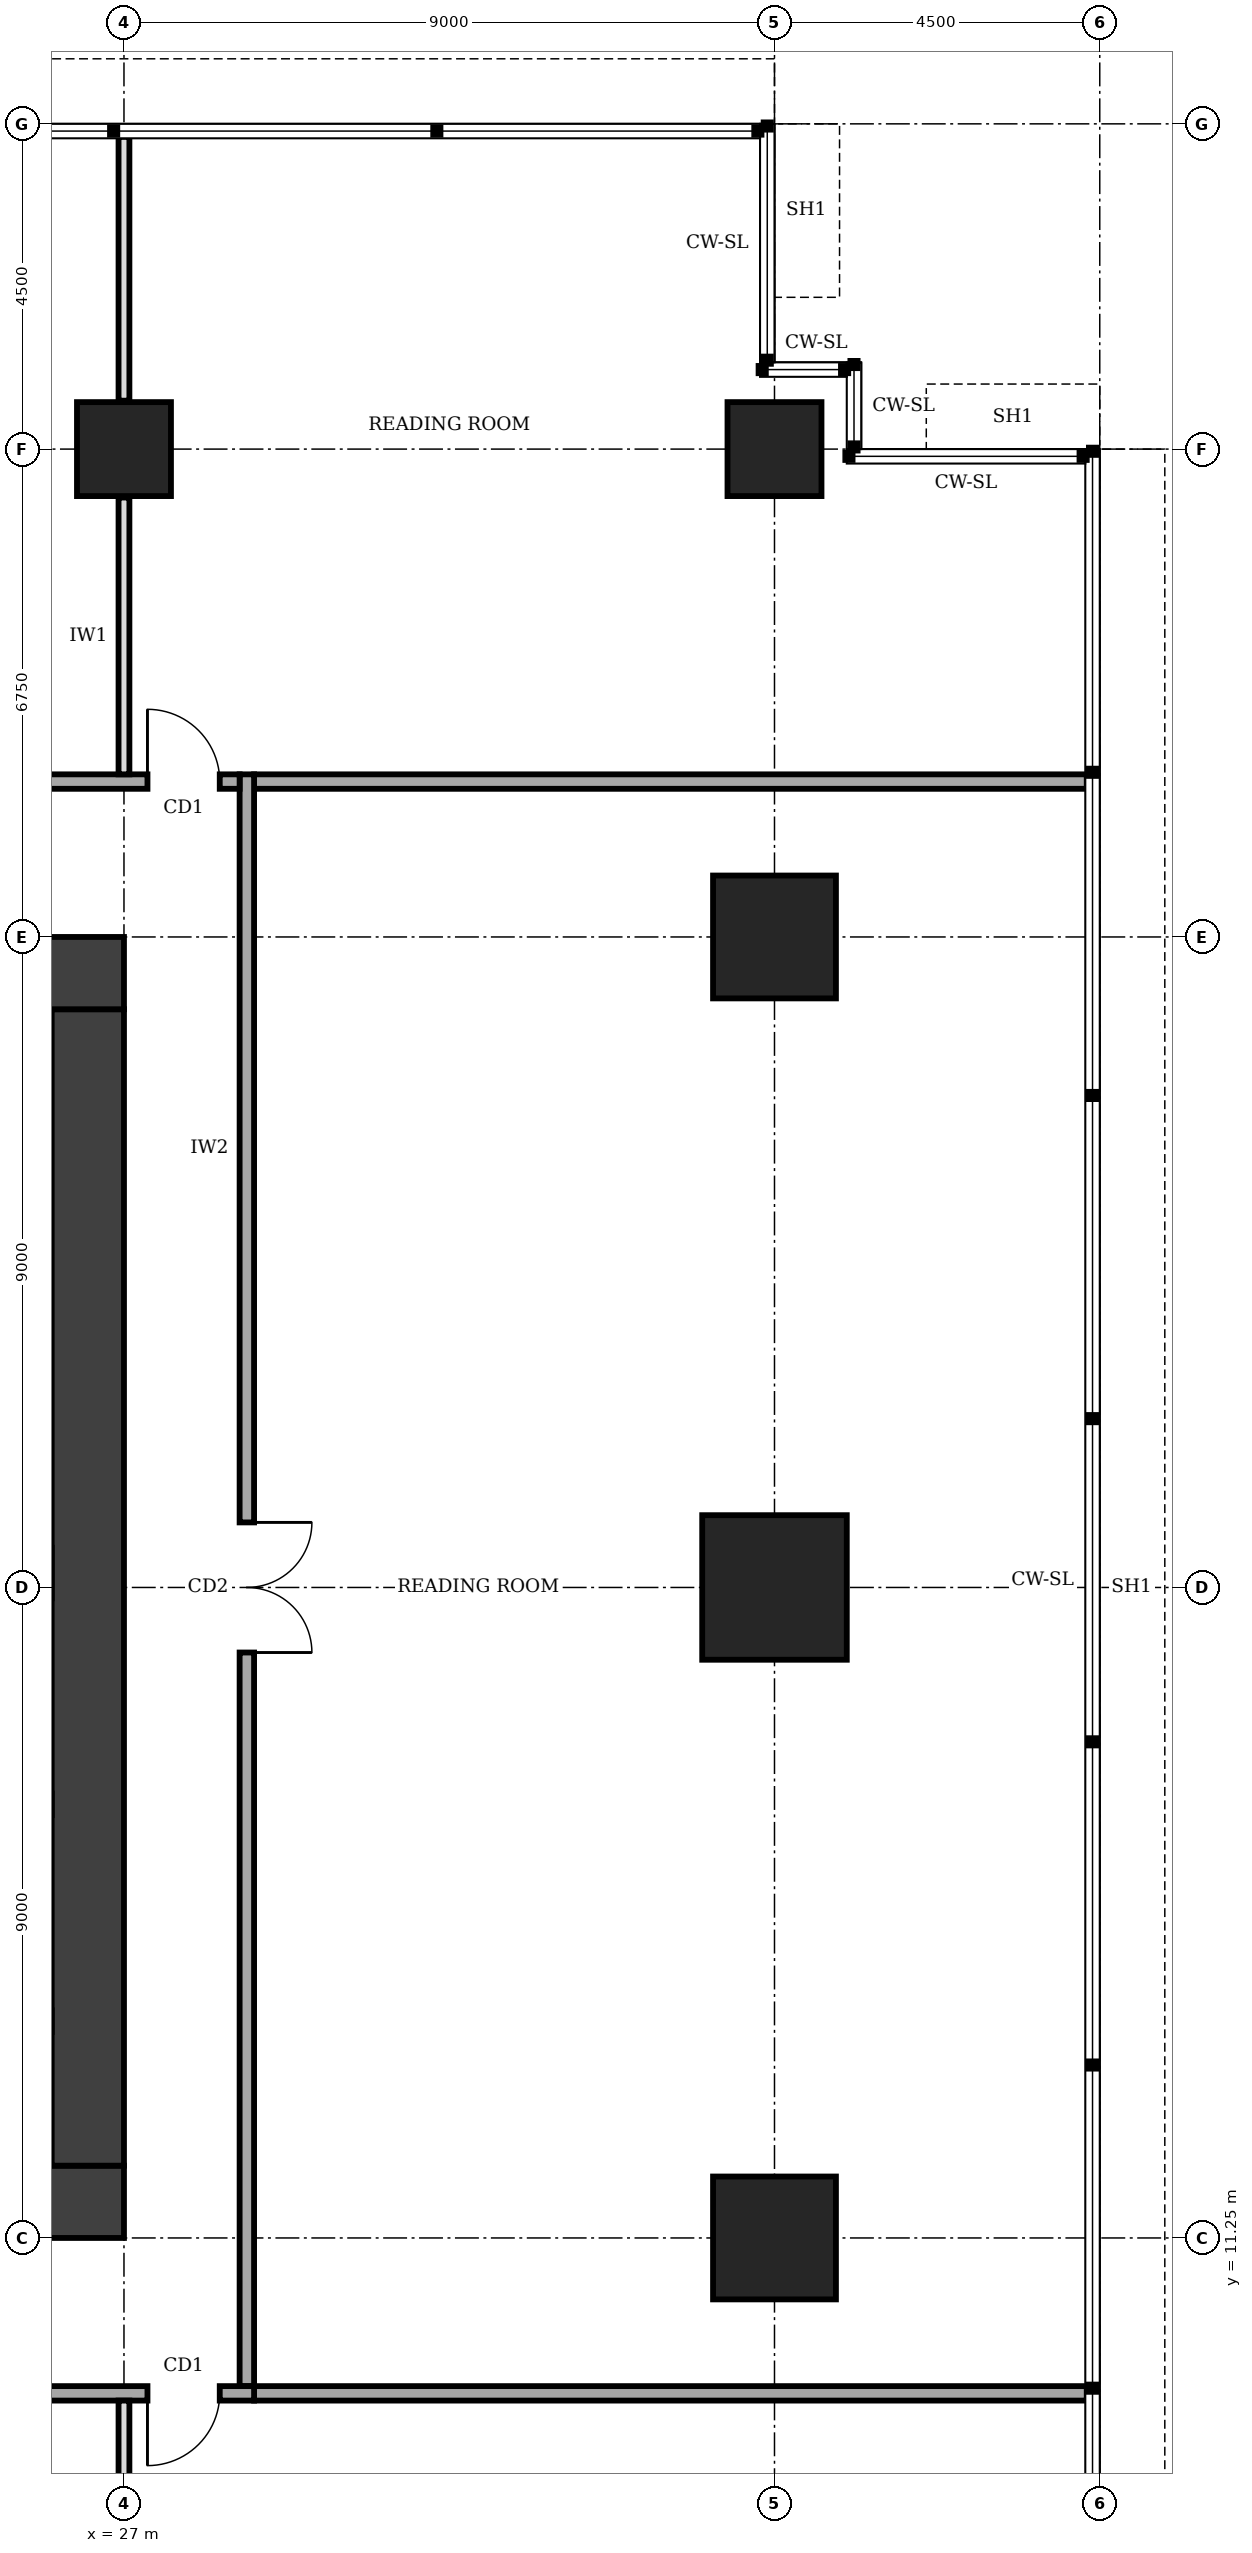
"""IFC4 building model, lengths in metres.
Left out: names, types, materials, properties, quantities, classifications, styles, units other than length and angle.
Written with IfcOpenShell. Run it as: python <this file> out.ifc"""

import sys

from ifc_helpers import new_model, si_unit, direction, frame, frame_2d, origin, origin_2d, place, context, subcontext, project, spatial, rectangle, extrude, element, fill, save


model = new_model("IFC4")
c1 = context("Model", 3, precision=1e-05, world=origin(), true_north=direction((0.0, 1.0)))
c2 = subcontext(c1, "Body", "Model", "MODEL_VIEW")
j1 = project(units=[si_unit("LENGTHUNIT", "METRE"), si_unit("PLANEANGLEUNIT", "RADIAN")], contexts=[c1])
p1 = place(None, origin())
s1 = spatial("IfcSite", under=j1, at=p1, CompositionType="ELEMENT")
p2 = place(p1, origin())
s2 = spatial("IfcBuilding", under=s1, at=p2, CompositionType="ELEMENT")
p3 = place(p2, frame((0.0, 0.0, 293.0)))
s3 = spatial("IfcBuildingStorey", under=s2, at=p3, CompositionType="ELEMENT", Elevation=293.0)
p4 = place(p3, frame((13.5, 11.75, 0.0), z_axis=(0.0, 0.0, 1.0), x_axis=(1.0, 0.0, 0.0)))
e1 = element("IfcWall", 1, at=p4, inside=s3, PredefinedType="SHEAR", context=c2, shape_type="SweptSolid", body=[
    extrude(rectangle(XDim=13.5, YDim=1.0, at=frame_2d((6.75, 0.0))), origin(), (0.0, 0.0, 1.0), 4.0),
])
p5 = place(p4, frame((4.75, 0.0, 0.0)))
e2 = element("IfcOpeningElement", 2, at=p5, cuts=e1, PredefinedType="OPENING", context=c2, shape_type="SweptSolid", body=[
    extrude(rectangle(XDim=1.0, YDim=2.1, at=frame_2d((0.5, 1.05))), frame((0.0, 0.51, 0.0), z_axis=(0.0, -1.0, 0.0), x_axis=(1.0, 0.0, 0.0)), (0.0, 0.0, 1.0), 1.02),
])
p6 = place(p3, frame((26.5, 12.25, 0.0), z_axis=(0.0, 0.0, 1.0), x_axis=(0.0, 1.0, 0.0)))
e3 = element("IfcWall", 3, at=p6, inside=s3, PredefinedType="SHEAR", context=c2, shape_type="SweptSolid", body=[
    extrude(rectangle(XDim=16.0, YDim=1.0, at=frame_2d((8.0, 0.0))), origin(), (0.0, 0.0, 1.0), 4.0),
])
p7 = place(p3, frame((27.0, 28.75, 0.0), z_axis=(0.0, 0.0, 1.0), x_axis=(-1.0, 0.0, 0.0)))
e4 = element("IfcWall", 4, at=p7, inside=s3, PredefinedType="SHEAR", context=c2, shape_type="SweptSolid", body=[
    extrude(rectangle(XDim=13.5, YDim=1.0, at=frame_2d((6.75, 0.0))), origin(), (0.0, 0.0, 1.0), 4.0),
])
p8 = place(p7, frame((4.75, 0.0, 0.0)))
e5 = element("IfcOpeningElement", 5, at=p8, cuts=e4, PredefinedType="OPENING", context=c2, shape_type="SweptSolid", body=[
    extrude(rectangle(XDim=1.8, YDim=2.1, at=frame_2d((0.9, 1.05))), frame((0.0, 0.51, 0.0), z_axis=(0.0, -1.0, 0.0), x_axis=(1.0, 0.0, 0.0)), (0.0, 0.0, 1.0), 1.02),
])
p9 = place(p3, frame((36.0, 11.25, 0.0), z_axis=(0.0, 0.0, 1.0), x_axis=(1.0, 0.0, 0.0)))
e6 = element("IfcColumn", 6, at=p9, inside=s3, PredefinedType="COLUMN", context=c2, shape_type="SweptSolid", body=[
    extrude(rectangle(XDim=1.7, YDim=1.7, at=origin_2d()), origin(), (0.0, 0.0, 1.0), 4.0),
])
p10 = place(p3, frame((36.0, 20.25, 0.0), z_axis=(0.0, 0.0, 1.0), x_axis=(1.0, 0.0, 0.0)))
e7 = element("IfcColumn", 7, at=p10, inside=s3, PredefinedType="COLUMN", context=c2, shape_type="SweptSolid", body=[
    extrude(rectangle(XDim=2.0, YDim=2.0, at=origin_2d()), origin(), (0.0, 0.0, 1.0), 4.0),
])
p11 = place(p3, frame((36.0, 29.25, 0.0), z_axis=(0.0, 0.0, 1.0), x_axis=(1.0, 0.0, 0.0)))
e8 = element("IfcColumn", 8, at=p11, inside=s3, PredefinedType="COLUMN", context=c2, shape_type="SweptSolid", body=[
    extrude(rectangle(XDim=1.7, YDim=1.7, at=origin_2d()), origin(), (0.0, 0.0, 1.0), 4.0),
])
for number, where, z_axis, x_axis in (
    (9, (27.0, 36.0, 0.0), (0.0, 0.0, 1.0), (1.0, 0.0, 0.0)),
    (10, (36.0, 36.0, 0.0), (0.0, 0.0, 1.0), (1.0, 0.0, 0.0)),
):
    element("IfcColumn", number, at=place(p3, frame(where, z_axis=z_axis, x_axis=x_axis)), inside=s3, PredefinedType="COLUMN", context=c2, shape_type="SweptSolid", body=[
        extrude(rectangle(XDim=1.3, YDim=1.3, at=origin_2d()), origin(), (0.0, 0.0, 1.0), 4.0),
    ])
p12 = place(p3, frame((11.9, 9.1, 0.0), z_axis=(0.0, 0.0, 1.0), x_axis=(1.0, 0.0, 0.0)))
e11 = element("IfcWall", 11, at=p12, inside=s3, PredefinedType="SOLIDWALL", context=c2, shape_type="SweptSolid", body=[
    extrude(rectangle(XDim=16.9, YDim=0.2, at=frame_2d((8.45, 0.0))), origin(), (0.0, 0.0, 1.0), 3.75),
])
p13 = place(p12, frame((0.275, 0.0, 0.0)))
e12 = element("IfcOpeningElement", 12, at=p13, cuts=e11, PredefinedType="OPENING", context=c2, shape_type="SweptSolid", body=[
    extrude(rectangle(XDim=1.0, YDim=2.1, at=frame_2d((0.5, 1.05))), frame((0.0, 0.11, 0.0), z_axis=(0.0, -1.0, 0.0), x_axis=(1.0, 0.0, 0.0)), (0.0, 0.0, 1.0), 0.22),
])
p14 = place(p12, frame((7.45, 0.0, 0.0)))
e13 = element("IfcOpeningElement", 13, at=p14, cuts=e11, PredefinedType="OPENING", context=c2, shape_type="SweptSolid", body=[
    extrude(rectangle(XDim=1.8, YDim=2.1, at=frame_2d((0.9, 1.05))), frame((0.0, 0.11, 0.0), z_axis=(0.0, -1.0, 0.0), x_axis=(1.0, 0.0, 0.0)), (0.0, 0.0, 1.0), 0.22),
])
p15 = place(p12, frame((15.425, 0.0, 0.0)))
e14 = element("IfcOpeningElement", 14, at=p15, cuts=e11, PredefinedType="OPENING", context=c2, shape_type="SweptSolid", body=[
    extrude(rectangle(XDim=1.0, YDim=2.1, at=frame_2d((0.5, 1.05))), frame((0.0, 0.11, 0.0), z_axis=(0.0, -1.0, 0.0), x_axis=(1.0, 0.0, 0.0)), (0.0, 0.0, 1.0), 0.22),
])
p16 = place(p3, frame((28.7, 9.2, 0.0), z_axis=(0.0, 0.0, 1.0), x_axis=(0.0, 1.0, 0.0)))
e15 = element("IfcWall", 15, at=p16, inside=s3, PredefinedType="SOLIDWALL", context=c2, shape_type="SweptSolid", body=[
    extrude(rectangle(XDim=22.3, YDim=0.2, at=frame_2d((11.15, 0.0))), origin(), (0.0, 0.0, 1.0), 3.75),
])
p17 = place(p16, frame((10.15, 0.0, 0.0)))
e16 = element("IfcOpeningElement", 16, at=p17, cuts=e15, PredefinedType="OPENING", context=c2, shape_type="SweptSolid", body=[
    extrude(rectangle(XDim=1.8, YDim=2.1, at=frame_2d((0.9, 1.05))), frame((0.0, 0.11, 0.0), z_axis=(0.0, -1.0, 0.0), x_axis=(1.0, 0.0, 0.0)), (0.0, 0.0, 1.0), 0.22),
])
p18 = place(p3, frame((28.6, 31.4, 0.0), z_axis=(0.0, 0.0, 1.0), x_axis=(-1.0, 0.0, 0.0)))
e17 = element("IfcWall", 17, at=p18, inside=s3, PredefinedType="SOLIDWALL", context=c2, shape_type="SweptSolid", body=[
    extrude(rectangle(XDim=16.9, YDim=0.2, at=frame_2d((8.45, 0.0))), origin(), (0.0, 0.0, 1.0), 3.75),
])
p19 = place(p18, frame((15.425, 0.0, 0.0)))
e18 = element("IfcOpeningElement", 18, at=p19, cuts=e17, PredefinedType="OPENING", context=c2, shape_type="SweptSolid", body=[
    extrude(rectangle(XDim=1.0, YDim=2.1, at=frame_2d((0.5, 1.05))), frame((0.0, 0.11, 0.0), z_axis=(0.0, -1.0, 0.0), x_axis=(1.0, 0.0, 0.0)), (0.0, 0.0, 1.0), 0.22),
])
p20 = place(p18, frame((7.45, 0.0, 0.0)))
e19 = element("IfcOpeningElement", 19, at=p20, cuts=e17, PredefinedType="OPENING", context=c2, shape_type="SweptSolid", body=[
    extrude(rectangle(XDim=1.8, YDim=2.1, at=frame_2d((0.9, 1.05))), frame((0.0, 0.11, 0.0), z_axis=(0.0, -1.0, 0.0), x_axis=(1.0, 0.0, 0.0)), (0.0, 0.0, 1.0), 0.22),
])
p21 = place(p18, frame((0.275, 0.0, 0.0)))
e20 = element("IfcOpeningElement", 20, at=p21, cuts=e17, PredefinedType="OPENING", context=c2, shape_type="SweptSolid", body=[
    extrude(rectangle(XDim=1.0, YDim=2.1, at=frame_2d((0.5, 1.05))), frame((0.0, 0.11, 0.0), z_axis=(0.0, -1.0, 0.0), x_axis=(1.0, 0.0, 0.0)), (0.0, 0.0, 1.0), 0.22),
])
for number, where, z_axis, x_axis in (
    (21, (28.8, 9.1, 0.0), (0.0, 0.0, 1.0), (1.0, 0.0, 0.0)),
    (22, (28.8, 31.4, 0.0), (0.0, 0.0, 1.0), (1.0, 0.0, 0.0)),
):
    element("IfcWall", number, at=place(p3, frame(where, z_axis=z_axis, x_axis=x_axis)), inside=s3, PredefinedType="SOLIDWALL", context=c2, shape_type="SweptSolid", body=[
        extrude(rectangle(XDim=11.52, YDim=0.2, at=frame_2d((5.76, 0.0))), origin(), (0.0, 0.0, 1.0), 3.75),
    ])
for number, where, z_axis, x_axis in (
    (23, (27.0, 5.17, 0.0), (0.0, 0.0, 1.0), (0.0, 1.0, 0.0)),
    (24, (27.0, 31.5, 0.0), (0.0, 0.0, 1.0), (0.0, 1.0, 0.0)),
):
    element("IfcWall", number, at=place(p3, frame(where, z_axis=z_axis, x_axis=x_axis)), inside=s3, PredefinedType="PARTITIONING", context=c2, shape_type="SweptSolid", body=[
        extrude(rectangle(XDim=3.83, YDim=0.15, at=frame_2d((1.915, 0.0))), origin(), (0.0, 0.0, 1.0), 2.85),
    ])
p22 = place(p3, frame((27.0, 36.67, 0.0), z_axis=(0.0, 0.0, 1.0), x_axis=(0.0, 1.0, 0.0)))
e25 = element("IfcWall", 25, at=p22, inside=s3, PredefinedType="PARTITIONING", context=c2, shape_type="SweptSolid", body=[
    extrude(rectangle(XDim=3.65, YDim=0.15, at=frame_2d((1.825, 0.0))), origin(), (0.0, 0.0, 1.0), 2.85),
])
p23 = place(p15, frame((1.0, 0.0, 0.0), z_axis=(0.0, 0.0, 1.0), x_axis=(-1.0, 0.0, 0.0)))
e26 = element("IfcDoor", 26, at=p23, inside=s3, OperationType="SINGLE_SWING_RIGHT", PredefinedType="DOOR", context=c2, shape_type="SweptSolid", body=[
    extrude(rectangle(XDim=1.0, YDim=2.1, at=frame_2d((0.5, 1.05))), frame((0.0, 0.025, 0.0), z_axis=(0.0, -1.0, 0.0), x_axis=(1.0, 0.0, 0.0)), (0.0, 0.0, 1.0), 0.05),
])
fill(e14, e26)
p24 = place(p17, frame((1.8, 0.0, 0.0), z_axis=(0.0, 0.0, 1.0), x_axis=(-1.0, 0.0, 0.0)))
e27 = element("IfcDoor", 27, at=p24, inside=s3, OperationType="DOUBLE_DOOR_SINGLE_SWING", PredefinedType="DOOR", context=c2, shape_type="SweptSolid", body=[
    extrude(rectangle(XDim=1.8, YDim=2.1, at=frame_2d((0.9, 1.05))), frame((0.0, 0.025, 0.0), z_axis=(0.0, -1.0, 0.0), x_axis=(1.0, 0.0, 0.0)), (0.0, 0.0, 1.0), 0.05),
])
fill(e16, e27)
p25 = place(p21, frame((1.0, 0.0, 0.0), z_axis=(0.0, 0.0, 1.0), x_axis=(-1.0, 0.0, 0.0)))
e28 = element("IfcDoor", 28, at=p25, inside=s3, OperationType="SINGLE_SWING_LEFT", PredefinedType="DOOR", context=c2, shape_type="SweptSolid", body=[
    extrude(rectangle(XDim=1.0, YDim=2.1, at=frame_2d((0.5, 1.05))), frame((0.0, 0.025, 0.0), z_axis=(0.0, -1.0, 0.0), x_axis=(1.0, 0.0, 0.0)), (0.0, 0.0, 1.0), 0.05),
])
fill(e20, e28)
save(model, sys.argv[1])
